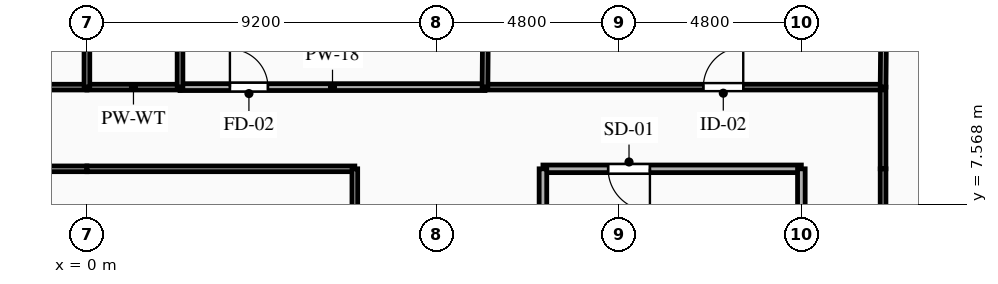
"""IFC4 building model, lengths in metres.
Left out: names, types, materials, properties, quantities, classifications, styles, units other than length and angle.
Written with IfcOpenShell. Run it as: python <this file> out.ifc"""

import sys

from ifc_helpers import new_model, si_unit, direction, frame, frame_2d, origin, place, context, subcontext, project, spatial, rectangle, extrude, element, fill, save


model = new_model("IFC4")
c1 = context("Model", 3, precision=1e-05, world=origin(), true_north=direction((0.0, 1.0)))
c2 = subcontext(c1, "Body", "Model", "MODEL_VIEW")
j1 = project(units=[si_unit("LENGTHUNIT", "METRE"), si_unit("PLANEANGLEUNIT", "RADIAN")], contexts=[c1])
p1 = place(None, origin())
s1 = spatial("IfcSite", under=j1, at=p1, CompositionType="ELEMENT")
p2 = place(p1, origin())
s2 = spatial("IfcBuilding", under=s1, at=p2, CompositionType="ELEMENT")
p3 = place(p2, frame((0.0, 0.0, 199.75)))
s3 = spatial("IfcBuildingStorey", under=s2, at=p3, CompositionType="ELEMENT", Elevation=199.75)
p4 = place(p3, frame((18.8, 8.5, 0.0), z_axis=(0.0, 0.0, 1.0), x_axis=(-1.0, 0.0, 0.0)))
e1 = element("IfcWall", 1, at=p4, inside=s3, PredefinedType="PARTITIONING", context=c2, shape_type="SweptSolid", body=[
    extrude(rectangle(XDim=6.8, YDim=0.2, at=frame_2d((3.4, 0.0))), origin(), (0.0, 0.0, 1.0), 3.04),
])
p5 = place(p4, frame((3.985, 0.0, 0.0)))
e2 = element("IfcOpeningElement", 2, at=p5, cuts=e1, PredefinedType="OPENING", context=c2, shape_type="SweptSolid", body=[
    extrude(rectangle(XDim=1.1, YDim=2.15, at=frame_2d((0.55, 1.075))), frame((0.0, 0.11, 0.0), z_axis=(0.0, -1.0, 0.0), x_axis=(1.0, 0.0, 0.0)), (0.0, 0.0, 1.0), 0.22),
])
p6 = place(p3, frame((18.8, 5.6, 0.0), z_axis=(0.0, 0.0, 1.0), x_axis=(0.0, 1.0, 0.0)))
e3 = element("IfcWall", 3, at=p6, inside=s3, PredefinedType="PARTITIONING", context=c2, shape_type="SweptSolid", body=[
    extrude(rectangle(XDim=2.9, YDim=0.2, at=frame_2d((1.45, 0.0))), origin(), (0.0, 0.0, 1.0), 2.665),
])
p7 = place(p3, frame((12.0, 8.5, 0.0), z_axis=(0.0, 0.0, 1.0), x_axis=(0.0, -1.0, 0.0)))
e4 = element("IfcWall", 4, at=p7, inside=s3, PredefinedType="PARTITIONING", context=c2, shape_type="SweptSolid", body=[
    extrude(rectangle(XDim=2.9, YDim=0.2, at=frame_2d((1.45, 0.0))), origin(), (0.0, 0.0, 1.0), 3.04),
])
p8 = place(p3, frame((-8.125, 10.65, 0.0), z_axis=(0.0, 0.0, 1.0), x_axis=(1.0, 0.0, 0.0)))
e5 = element("IfcWall", 5, at=p8, inside=s3, PredefinedType="PARTITIONING", context=c2, shape_type="SweptSolid", body=[
    extrude(rectangle(XDim=8.125, YDim=0.15, at=frame_2d((4.062, 0.0))), origin(), (0.0, 0.0, 1.0), 3.04),
])
p9 = place(p8, frame((3.587, 0.0, 0.0)))
e6 = element("IfcOpeningElement", 6, at=p9, cuts=e5, PredefinedType="OPENING", context=c2, shape_type="SweptSolid", body=[
    extrude(rectangle(XDim=0.95, YDim=2.1, at=frame_2d((0.475, 1.05))), frame((0.0, 0.085, 0.0), z_axis=(0.0, -1.0, 0.0), x_axis=(1.0, 0.0, 0.0)), (0.0, 0.0, 1.0), 0.17),
])
p10 = place(p3, frame((0.0, 8.5, 0.0), z_axis=(0.0, 0.0, 1.0), x_axis=(-1.0, 0.0, 0.0)))
e7 = element("IfcWall", 7, at=p10, inside=s3, PredefinedType="PARTITIONING", context=c2, shape_type="SweptSolid", body=[
    extrude(rectangle(XDim=7.05, YDim=0.15, at=frame_2d((3.525, 0.0))), origin(), (0.0, 0.0, 1.0), 3.04),
])
p11 = place(p3, frame((20.95, 10.65, 0.0), z_axis=(0.0, 0.0, 1.0), x_axis=(0.0, -1.0, 0.0)))
e8 = element("IfcWall", 8, at=p11, inside=s3, PredefinedType="PARTITIONING", context=c2, shape_type="SweptSolid", body=[
    extrude(rectangle(XDim=2.15, YDim=0.15, at=frame_2d((1.075, 0.0))), origin(), (0.0, 0.0, 1.0), 3.04),
])
p12 = place(p3, frame((2.45, 10.65, 0.0), z_axis=(0.0, 0.0, 1.0), x_axis=(1.0, 0.0, 0.0)))
e9 = element("IfcWall", 9, at=p12, inside=s3, PredefinedType="PARTITIONING", context=c2, shape_type="SweptSolid", body=[
    extrude(rectangle(XDim=8.025, YDim=0.18, at=frame_2d((4.013, 0.0))), origin(), (0.0, 0.0, 1.0), 3.04),
])
p13 = place(p12, frame((1.313, 0.0, 0.0)))
e10 = element("IfcOpeningElement", 10, at=p13, cuts=e9, PredefinedType="OPENING", context=c2, shape_type="SweptSolid", body=[
    extrude(rectangle(XDim=1.0, YDim=2.15, at=frame_2d((0.5, 1.075))), frame((0.0, 0.1, 0.0), z_axis=(0.0, -1.0, 0.0), x_axis=(1.0, 0.0, 0.0)), (0.0, 0.0, 1.0), 0.2),
])
p14 = place(p3, frame((0.0, 10.65, 0.0), z_axis=(0.0, 0.0, 1.0), x_axis=(1.0, 0.0, 0.0)))
e11 = element("IfcWall", 11, at=p14, inside=s3, PredefinedType="PLUMBINGWALL", context=c2, shape_type="SweptSolid", body=[
    extrude(rectangle(XDim=2.45, YDim=0.15, at=frame_2d((1.225, 0.0))), origin(), (0.0, 0.0, 1.0), 3.04),
])
p15 = place(p3, frame((10.475, 10.65, 0.0), z_axis=(0.0, 0.0, 1.0), x_axis=(1.0, 0.0, 0.0)))
e12 = element("IfcWall", 12, at=p15, inside=s3, PredefinedType="PARTITIONING", context=c2, shape_type="SweptSolid", body=[
    extrude(rectangle(XDim=10.475, YDim=0.15, at=frame_2d((5.237, 0.0))), origin(), (0.0, 0.0, 1.0), 3.04),
])
p16 = place(p15, frame((5.746, 0.0, 0.0)))
e13 = element("IfcOpeningElement", 13, at=p16, cuts=e12, PredefinedType="OPENING", context=c2, shape_type="SweptSolid", body=[
    extrude(rectangle(XDim=1.05, YDim=2.15, at=frame_2d((0.525, 1.075))), frame((0.0, 0.085, 0.0), z_axis=(0.0, -1.0, 0.0), x_axis=(1.0, 0.0, 0.0)), (0.0, 0.0, 1.0), 0.17),
])
p17 = place(p3, frame((7.05, 8.5, 0.0), z_axis=(0.0, 0.0, 1.0), x_axis=(-1.0, 0.0, 0.0)))
e14 = element("IfcWall", 14, at=p17, inside=s3, PredefinedType="PARTITIONING", context=c2, shape_type="SweptSolid", body=[
    extrude(rectangle(XDim=7.05, YDim=0.15, at=frame_2d((3.525, 0.0))), origin(), (0.0, 0.0, 1.0), 3.04),
])
p18 = place(p3, frame((20.95, 8.5, 0.0), z_axis=(0.0, 0.0, 1.0), x_axis=(0.0, -1.0, 0.0)))
e15 = element("IfcWall", 15, at=p18, inside=s3, PredefinedType="PARTITIONING", context=c2, shape_type="SweptSolid", body=[
    extrude(rectangle(XDim=9.263, YDim=0.15, at=frame_2d((4.632, 0.0))), origin(), (0.0, 0.0, 1.0), 2.695),
])
p19 = place(p18, frame((6.751, 0.0, 0.0)))
e16 = element("IfcOpeningElement", 16, at=p19, cuts=e15, PredefinedType="OPENING", context=c2, shape_type="SweptSolid", body=[
    extrude(rectangle(XDim=1.05, YDim=2.15, at=frame_2d((0.525, 1.075))), frame((0.0, 0.085, 0.0), z_axis=(0.0, -1.0, 0.0), x_axis=(1.0, 0.0, 0.0)), (0.0, 0.0, 1.0), 0.17),
])
p20 = place(p3, frame((7.05, -0.8, 0.0), z_axis=(0.0, 0.0, 1.0), x_axis=(0.0, 1.0, 0.0)))
e17 = element("IfcWall", 17, at=p20, inside=s3, PredefinedType="PARTITIONING", context=c2, shape_type="SweptSolid", body=[
    extrude(rectangle(XDim=9.3, YDim=0.15, at=frame_2d((4.65, 0.0))), origin(), (0.0, 0.0, 1.0), 3.04),
])
p21 = place(p3, frame((20.95, 10.65, 0.0), z_axis=(0.0, 0.0, 1.0), x_axis=(0.009535990233, 0.999954531411, 0.0)))
e18 = element("IfcWall", 18, at=p21, inside=s3, PredefinedType="PARTITIONING", context=c2, shape_type="SweptSolid", body=[
    extrude(rectangle(XDim=4.608, YDim=0.15, at=frame_2d((2.304, 0.0))), origin(), (0.0, 0.0, 1.0), 2.665),
])
for number, where, z_axis, x_axis in (
    (19, (0.0, 12.8, 0.0), (0.0, 0.0, 1.0), (0.0, -1.0, 0.0)),
    (20, (2.45, 10.65, 0.0), (0.0, 0.0, 1.0), (0.0, 1.0, 0.0)),
):
    element("IfcWall", number, at=place(p3, frame(where, z_axis=z_axis, x_axis=x_axis)), inside=s3, PredefinedType="PLUMBINGWALL", context=c2, shape_type="SweptSolid", body=[
        extrude(rectangle(XDim=2.15, YDim=0.15, at=frame_2d((1.075, 0.0))), origin(), (0.0, 0.0, 1.0), 3.04),
    ])
p22 = place(p3, frame((10.519, 16.359, 0.0), z_axis=(0.0, 0.0, 1.0), x_axis=(-0.007654255135, -0.99997070576, 0.0)))
e21 = element("IfcWall", 21, at=p22, inside=s3, PredefinedType="PARTITIONING", context=c2, shape_type="SweptSolid", body=[
    extrude(rectangle(XDim=5.709, YDim=0.15, at=frame_2d((2.855, 0.0))), origin(), (0.0, 0.0, 1.0), 3.04),
])
p23 = place(p5, origin())
e22 = element("IfcDoor", 22, at=p23, inside=s3, OperationType="SINGLE_SWING_LEFT", PredefinedType="DOOR", context=c2, shape_type="SweptSolid", body=[
    extrude(rectangle(XDim=1.1, YDim=2.15, at=frame_2d((0.55, 1.075))), frame((0.0, 0.025, 0.0), z_axis=(0.0, -1.0, 0.0), x_axis=(1.0, 0.0, 0.0)), (0.0, 0.0, 1.0), 0.05),
])
fill(e2, e22)
p24 = place(p13, origin())
e23 = element("IfcDoor", 23, at=p24, inside=s3, OperationType="SINGLE_SWING_LEFT", PredefinedType="DOOR", context=c2, shape_type="SweptSolid", body=[
    extrude(rectangle(XDim=1.0, YDim=2.15, at=frame_2d((0.5, 1.075))), frame((0.0, 0.025, 0.0), z_axis=(0.0, -1.0, 0.0), x_axis=(1.0, 0.0, 0.0)), (0.0, 0.0, 1.0), 0.05),
])
fill(e10, e23)
p25 = place(p16, origin())
e24 = element("IfcDoor", 24, at=p25, inside=s3, OperationType="SINGLE_SWING_RIGHT", PredefinedType="DOOR", context=c2, shape_type="SweptSolid", body=[
    extrude(rectangle(XDim=1.05, YDim=2.15, at=frame_2d((0.525, 1.075))), frame((0.0, 0.025, 0.0), z_axis=(0.0, -1.0, 0.0), x_axis=(1.0, 0.0, 0.0)), (0.0, 0.0, 1.0), 0.05),
])
fill(e13, e24)
save(model, sys.argv[1])
